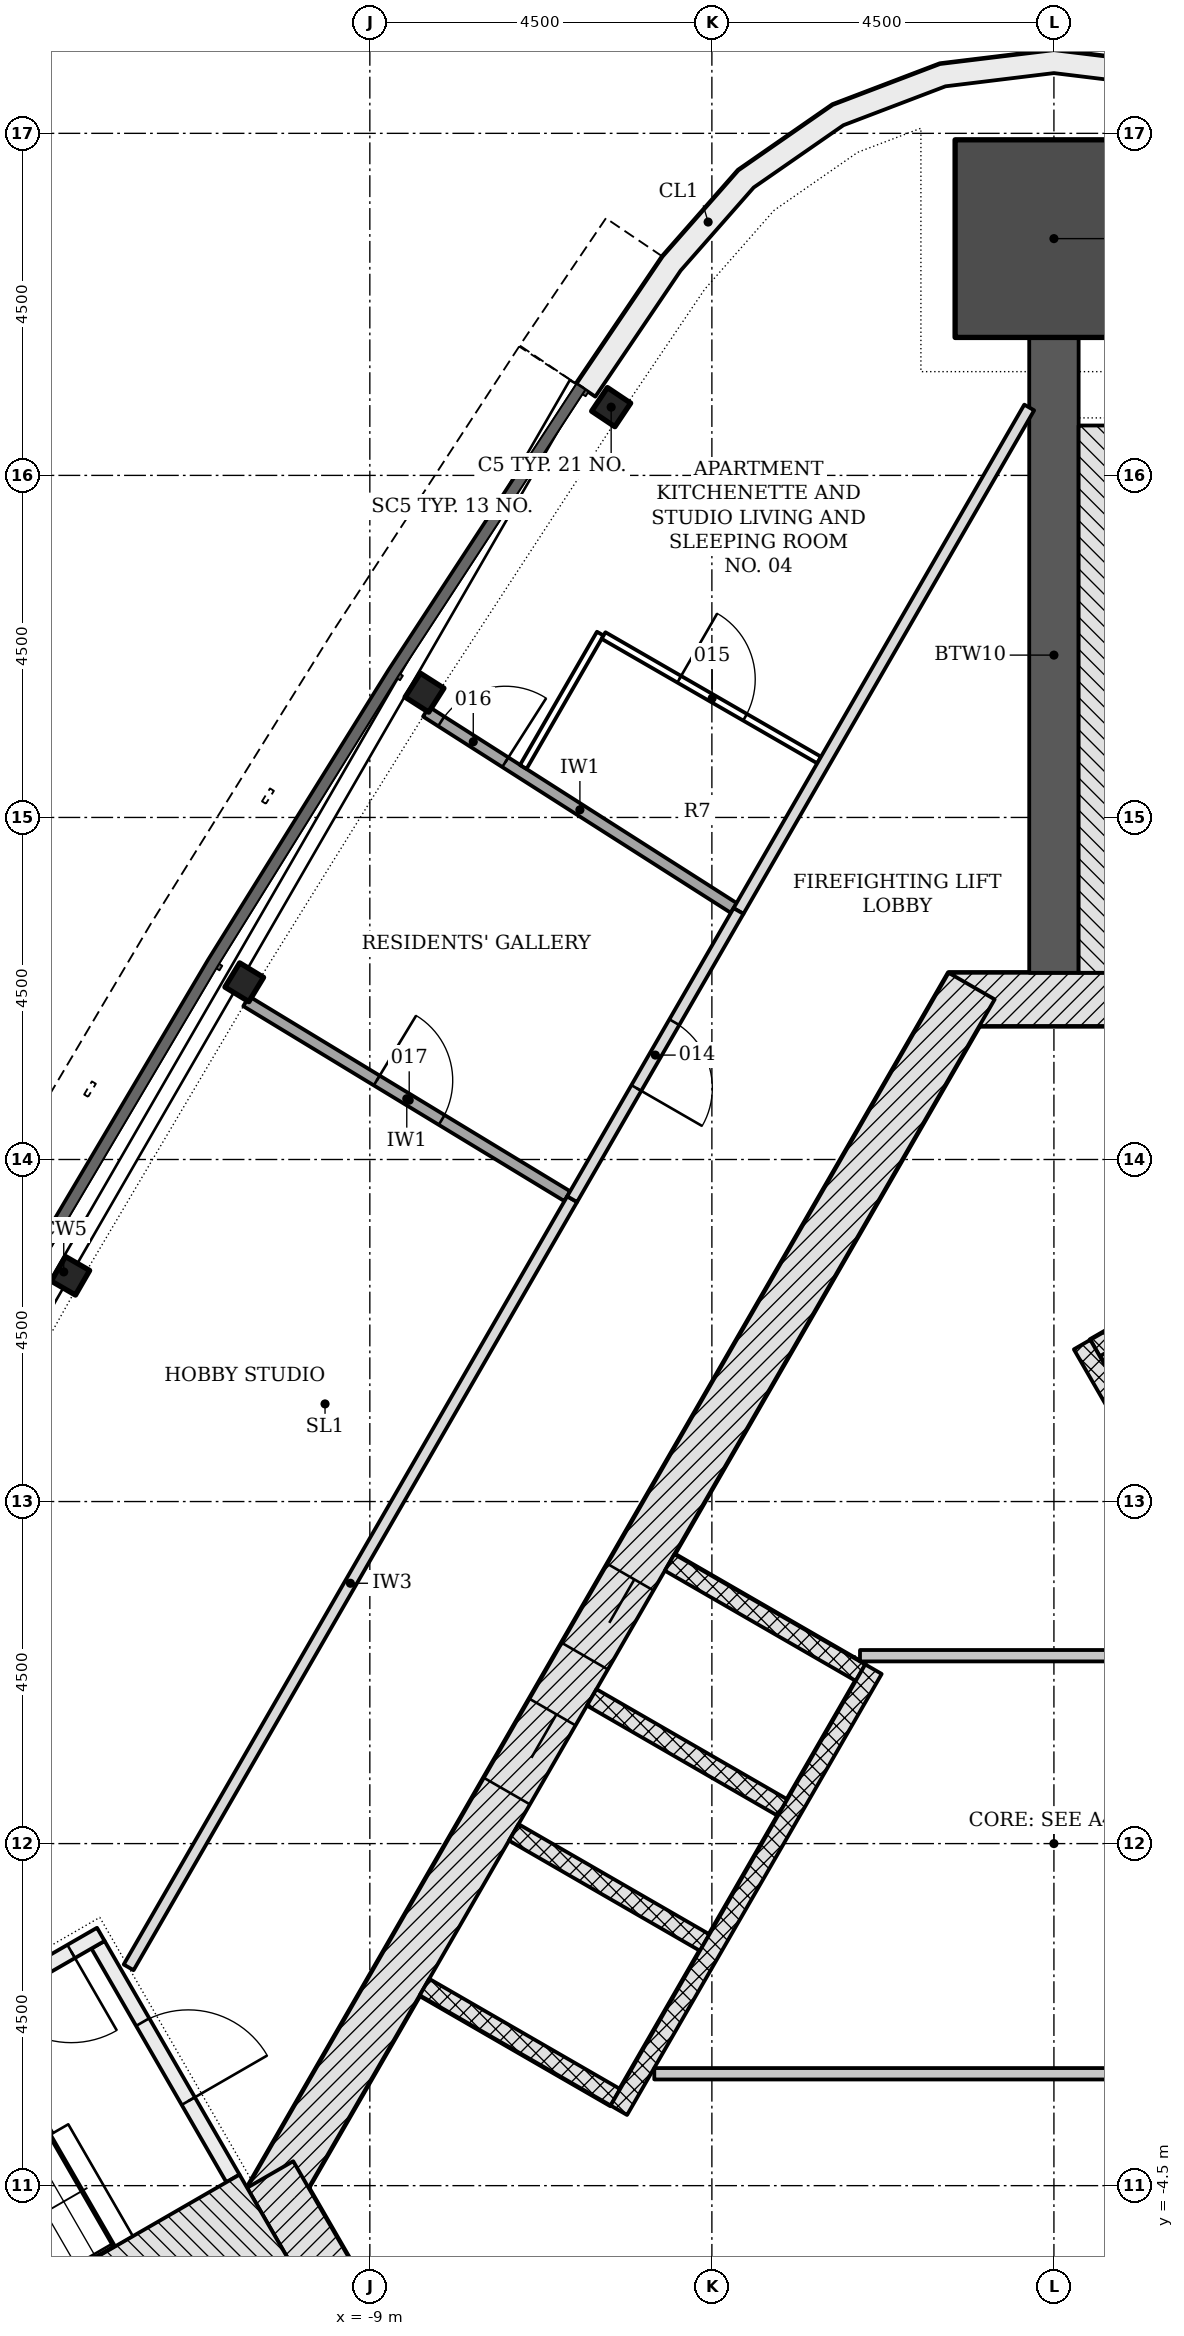
"""IFC4 building model, lengths in metres.
Left out: names, types, materials, properties, quantities, classifications, styles, units other than length and angle.
Written with IfcOpenShell. Run it as: python <this file> out.ifc"""

import sys

from ifc_helpers import new_model, si_unit, direction, frame, frame_2d, origin, origin_2d, place, context, subcontext, project, spatial, polyline, rectangle, i_section, outline, extrude, element, fill, save


model = new_model("IFC4")
c1 = context("Model", 3, precision=1e-05, world=origin(), true_north=direction((0.0, 1.0)))
c2 = subcontext(c1, "Body", "Model", "MODEL_VIEW")
j1 = project(units=[si_unit("LENGTHUNIT", "METRE"), si_unit("PLANEANGLEUNIT", "RADIAN")], contexts=[c1])
p1 = place(None, origin())
s1 = spatial("IfcSite", under=j1, at=p1, CompositionType="ELEMENT")
p2 = place(p1, origin())
s2 = spatial("IfcBuilding", under=s1, at=p2, CompositionType="ELEMENT")
p3 = place(p2, frame((0.0, 0.0, 222.0)))
s3 = spatial("IfcBuildingStorey", under=s2, at=p3, CompositionType="ELEMENT", Elevation=222.0)
p4 = place(p3, frame((1.386, 11.106, -0.2), z_axis=(0.0, 0.0, 1.0), x_axis=(-1.0, 0.0, 0.0)))
e1 = element("IfcWall", 1, at=p4, inside=s3, PredefinedType="SHEAR", context=c2, shape_type="SweptSolid", body=[
    extrude(rectangle(XDim=2.771, YDim=0.7, at=frame_2d((1.386, 0.0))), origin(), (0.0, 0.0, 1.0), 3.6),
])
p5 = place(p3, frame((-1.083, 11.281, -0.2), z_axis=(0.0, 0.0, 1.0), x_axis=(-0.500001446645, -0.866024568562, 0.0)))
e2 = element("IfcWall", 2, at=p5, inside=s3, PredefinedType="SHEAR", context=c2, shape_type="SweptSolid", body=[
    extrude(rectangle(XDim=18.458, YDim=0.7, at=frame_2d((9.229, 0.0))), origin(), (0.0, 0.0, 1.0), 3.6),
])
p6 = place(p5, frame((8.979, 0.0, 0.2)))
e3 = element("IfcOpeningElement", 3, at=p6, cuts=e2, PredefinedType="OPENING", context=c2, shape_type="SweptSolid", body=[
    extrude(rectangle(XDim=1.2, YDim=2.1, at=frame_2d((0.6, 1.05))), frame((0.0, 0.36, 0.0), z_axis=(0.0, -1.0, 0.0), x_axis=(1.0, 0.0, 0.0)), (0.0, 0.0, 1.0), 0.72),
])
p7 = place(p5, frame((11.029, 0.0, 0.2)))
e4 = element("IfcOpeningElement", 4, at=p7, cuts=e2, PredefinedType="OPENING", context=c2, shape_type="SweptSolid", body=[
    extrude(rectangle(XDim=1.2, YDim=2.1, at=frame_2d((0.6, 1.05))), frame((0.0, 0.36, 0.0), z_axis=(0.0, -1.0, 0.0), x_axis=(1.0, 0.0, 0.0)), (0.0, 0.0, 1.0), 0.72),
])
p8 = place(p3, frame((-10.311, -4.353, -0.2), z_axis=(0.0, 0.0, 1.0), x_axis=(0.500042739161, -0.866000726912, 0.0)))
e5 = element("IfcWall", 5, at=p8, inside=s3, PredefinedType="SHEAR", context=c2, shape_type="SweptSolid", body=[
    extrude(rectangle(XDim=2.771, YDim=0.7, at=frame_2d((1.386, 0.0))), origin(), (0.0, 0.0, 1.0), 3.6),
])
p9 = place(p3, frame((0.0, 11.456, -0.2), z_axis=(0.0, 0.0, 1.0), x_axis=(0.0, 1.0, 0.0)))
e6 = element("IfcWall", 6, at=p9, inside=s3, PredefinedType="SHEAR", context=c2, shape_type="SweptSolid", body=[
    extrude(rectangle(XDim=8.359, YDim=0.65, at=frame_2d((4.179, 0.0))), origin(), (0.0, 0.0, 1.0), 3.6),
])
p10 = place(p3, frame((0.0, 21.115, -0.2), z_axis=(0.0, 0.0, 1.0), x_axis=(0.0, 1.0, 0.0)))
e7 = element("IfcColumn", 7, at=p10, inside=s3, PredefinedType="COLUMN", context=c2, shape_type="SweptSolid", body=[
    extrude(rectangle(XDim=2.6, YDim=2.6, at=origin_2d()), origin(), (0.0, 0.0, 1.0), 3.6),
])
for number, where, z_axis, x_axis in (
    (8, (-5.825, 18.898, -0.2), (0.0, 0.0, 1.0), (-0.556, -0.831, 0.0)),
    (9, (-8.281, 15.142, -0.2), (0.0, 0.0, 1.0), (-0.538, -0.843, 0.0)),
    (10, (-10.652, 11.332, -0.2), (0.0, 0.0, 1.0), (-0.519, -0.855, 0.0)),
    (11, (-12.939, 7.47, -0.2), (0.0, 0.0, 1.0), (-0.5, -0.866, 0.0)),
):
    element("IfcColumn", number, at=place(p3, frame(where, z_axis=z_axis, x_axis=x_axis)), inside=s3, PredefinedType="COLUMN", context=c2, shape_type="SweptSolid", body=[
        extrude(i_section(OverallWidth=0.373, OverallDepth=0.368, WebThickness=0.015, FlangeThickness=0.024, FilletRadius=0.015, at=origin_2d()), origin(), (0.0, 0.0, 1.0), 3.6),
    ])
p11 = place(p3, origin())
e12 = element("IfcWall", 12, at=p11, inside=s3, PredefinedType="NOTDEFINED", context=c2, shape_type="SweptSolid", body=[
    extrude(outline(polyline([(6.282, 19.204), (5.149, 20.879), (4.151, 22.013), (2.911, 22.874), (1.499, 23.412), (0.0, 23.595), (-1.499, 23.412), (-2.911, 22.874), (-4.151, 22.013), (-5.149, 20.879), (-6.282, 19.204), (-6.034, 19.036), (-4.911, 20.695), (-3.95, 21.787), (-2.77, 22.607), (-1.427, 23.119), (0.0, 23.293), (1.427, 23.119), (2.77, 22.607), (3.95, 21.787), (4.911, 20.695), (6.034, 19.036), (6.282, 19.204)])), origin(), (0.0, 0.0, 1.0), 3.3),
])
p12 = place(p3, frame((2.706, 7.769, -0.2), z_axis=(0.0, 0.0, 1.0), x_axis=(-0.866022959057, -0.500004234368, 0.0)))
e13 = element("IfcWall", 13, at=p12, inside=s3, PredefinedType="PARTITIONING", context=c2, shape_type="SweptSolid", body=[
    extrude(rectangle(XDim=2.5, YDim=0.25, at=frame_2d((1.25, 0.0))), origin(), (0.0, 0.0, 1.0), 3.6),
])
p13 = place(p3, frame((5.87, -2.961, 0.0), z_axis=(0.0, 0.0, 1.0), x_axis=(-0.50000615651, 0.866021849293, 0.0)))
e14 = element("IfcWall", 14, at=p13, inside=s3, PredefinedType="PARTITIONING", context=c2, shape_type="SweptSolid", body=[
    extrude(rectangle(XDim=11.0, YDim=0.25, at=frame_2d((5.5, 0.0))), origin(), (0.0, 0.0, 1.0), 3.4),
])
for number, where, z_axis, x_axis in (
    (15, (-5.056, 3.699, -0.2), (0.0, 0.0, 1.0), (0.866, -0.5, 0.0)),
    (16, (-6.081, 1.923, -0.2), (0.0, 0.0, 1.0), (0.866, -0.5, 0.0)),
    (17, (-7.106, 0.148, -0.2), (0.0, 0.0, 1.0), (0.866, -0.5, 0.0)),
    (18, (-8.281, -1.887, -0.2), (0.0, 0.0, 1.0), (0.866, -0.5, 0.0)),
):
    element("IfcWall", number, at=place(p3, frame(where, z_axis=z_axis, x_axis=x_axis)), inside=s3, PredefinedType="PARTITIONING", context=c2, shape_type="SweptSolid", body=[
        extrude(rectangle(XDim=2.9, YDim=0.25, at=frame_2d((1.45, 0.0))), origin(), (0.0, 0.0, 1.0), 3.6),
    ])
p14 = place(p3, frame((-2.374, 2.294, 0.0), z_axis=(0.0, 0.0, 1.0), x_axis=(-0.500003174267, -0.866023571113, 0.0)))
e19 = element("IfcWall", 19, at=p14, inside=s3, PredefinedType="PARTITIONING", context=c2, shape_type="SweptSolid", body=[
    extrude(rectangle(XDim=6.7, YDim=0.25, at=frame_2d((3.35, 0.0))), origin(), (0.0, 0.0, 1.0), 3.4),
])
p15 = place(p3, frame((-5.258, -3.028, 0.0), z_axis=(0.0, 0.0, 1.0), x_axis=(1.0, 0.0, 0.0)))
e20 = element("IfcWall", 20, at=p15, inside=s3, PredefinedType="PARTITIONING", context=c2, shape_type="SweptSolid", body=[
    extrude(rectangle(XDim=6.404, YDim=0.15, at=frame_2d((3.202, 0.0))), origin(), (0.0, 0.0, 1.0), 3.4),
])
p16 = place(p3, frame((-2.551, 2.472, 0.0), z_axis=(0.0, 0.0, 1.0), x_axis=(1.0, 0.0, 0.0)))
e21 = element("IfcWall", 21, at=p16, inside=s3, PredefinedType="PARTITIONING", context=c2, shape_type="SweptSolid", body=[
    extrude(rectangle(XDim=3.698, YDim=0.15, at=frame_2d((1.849, 0.0))), origin(), (0.0, 0.0, 1.0), 3.4),
])
p17 = place(p3, frame((0.955, 11.456, -0.2), z_axis=(0.0, 0.0, 1.0), x_axis=(0.0, 1.0, 0.0)))
e22 = element("IfcWall", 22, at=p17, inside=s3, PredefinedType="SHEAR", context=c2, shape_type="SweptSolid", body=[
    extrude(rectangle(XDim=7.2, YDim=1.261, at=frame_2d((3.6, 0.0))), origin(), (0.0, 0.0, 1.0), 3.6),
])
p18 = place(p3, frame((-12.576, -1.331, -0.2), z_axis=(0.0, 0.0, 1.0), x_axis=(0.499970499736, -0.8660424351, 0.0)))
e23 = element("IfcWall", 23, at=p18, inside=s3, PredefinedType="SHEAR", context=c2, shape_type="SweptSolid", body=[
    extrude(rectangle(XDim=3.55, YDim=0.2, at=frame_2d((1.775, 0.0))), origin(), (0.0, 0.0, 1.0), 3.6),
])
p19 = place(p18, frame((1.175, 0.0, 0.2)))
e24 = element("IfcOpeningElement", 24, at=p19, cuts=e23, PredefinedType="OPENING", context=c2, shape_type="SweptSolid", body=[
    extrude(rectangle(XDim=1.2, YDim=2.1, at=frame_2d((0.6, 1.05))), frame((0.0, 0.11, 0.0), z_axis=(0.0, -1.0, 0.0), x_axis=(1.0, 0.0, 0.0)), (0.0, 0.0, 1.0), 0.22),
])
p20 = place(p3, frame((-12.539, -1.194, -0.2), z_axis=(0.0, 0.0, 1.0), x_axis=(-0.866045472092, -0.499965239061, 0.0)))
e25 = element("IfcWall", 25, at=p20, inside=s3, PredefinedType="SHEAR", context=c2, shape_type="SweptSolid", body=[
    extrude(rectangle(XDim=5.6, YDim=0.2, at=frame_2d((2.8, 0.0))), origin(), (0.0, 0.0, 1.0), 3.6),
])
p21 = place(p20, frame((0.45, 0.0, 0.2)))
e26 = element("IfcOpeningElement", 26, at=p21, cuts=e25, PredefinedType="OPENING", context=c2, shape_type="SweptSolid", body=[
    extrude(rectangle(XDim=1.2, YDim=2.1, at=frame_2d((0.6, 1.05))), frame((0.0, 0.11, 0.0), z_axis=(0.0, -1.0, 0.0), x_axis=(1.0, 0.0, 0.0)), (0.0, 0.0, 1.0), 0.22),
])
p22 = place(p3, frame((-10.399, -4.901, -0.2), z_axis=(0.0, 0.0, 1.0), x_axis=(-0.866018442252, -0.500012057535, 0.0)))
e27 = element("IfcWall", 27, at=p22, inside=s3, PredefinedType="SHEAR", context=c2, shape_type="SweptSolid", body=[
    extrude(rectangle(XDim=7.2, YDim=1.261, at=frame_2d((3.6, 0.0))), origin(), (0.0, 0.0, 1.0), 3.6),
])
p23 = place(p3, frame((-0.325, 18.894, 0.0), z_axis=(0.0, 0.0, 1.0), x_axis=(-0.500004255962, -0.86602294659, 0.0)))
e28 = element("IfcWall", 28, at=p23, inside=s3, PredefinedType="PARTITIONING", context=c2, shape_type="SweptSolid", body=[
    extrude(rectangle(XDim=7.649, YDim=0.15, at=frame_2d((3.825, 0.0))), origin(), (0.0, 0.0, 1.0), 2.852),
])
p24 = place(p3, frame((-6.338, 8.478, 0.0), z_axis=(0.0, 0.0, 1.0), x_axis=(-0.499993497815, -0.86602915779, 0.0)))
e29 = element("IfcWall", 29, at=p24, inside=s3, PredefinedType="PARTITIONING", context=c2, shape_type="SweptSolid", body=[
    extrude(rectangle(XDim=11.67, YDim=0.15, at=frame_2d((5.835, 0.0))), origin(), (0.0, 0.0, 1.0), 2.852),
])
p25 = place(p3, frame((-8.26, 14.891, 0.0), z_axis=(0.0, 0.0, 1.0), x_axis=(0.843047331612, -0.537839378125, 0.0)))
e30 = element("IfcWall", 30, at=p25, inside=s3, PredefinedType="PARTITIONING", context=c2, shape_type="SweptSolid", body=[
    extrude(rectangle(XDim=4.8, YDim=0.15, at=frame_2d((2.4, 0.0))), origin(), (0.0, 0.0, 1.0), 3.4),
])
p26 = place(p25, frame((0.236, 0.0, 0.0)))
e31 = element("IfcOpeningElement", 31, at=p26, cuts=e30, PredefinedType="OPENING", context=c2, shape_type="SweptSolid", body=[
    extrude(rectangle(XDim=1.0, YDim=2.1, at=frame_2d((0.5, 1.05))), frame((0.0, 0.085, 0.0), z_axis=(0.0, -1.0, 0.0), x_axis=(1.0, 0.0, 0.0)), (0.0, 0.0, 1.0), 0.17),
])
p27 = place(p3, frame((-10.626, 11.082, 0.0), z_axis=(0.0, 0.0, 1.0), x_axis=(0.854742891139, -0.519051625609, 0.0)))
e32 = element("IfcWall", 32, at=p27, inside=s3, PredefinedType="PARTITIONING", context=c2, shape_type="SweptSolid", body=[
    extrude(rectangle(XDim=4.941, YDim=0.15, at=frame_2d((2.471, 0.0))), origin(), (0.0, 0.0, 1.0), 3.4),
])
p28 = place(p27, frame((2.008, 0.0, 0.0)))
e33 = element("IfcOpeningElement", 33, at=p28, cuts=e32, PredefinedType="OPENING", context=c2, shape_type="SweptSolid", body=[
    extrude(rectangle(XDim=1.0, YDim=2.1, at=frame_2d((0.5, 1.05))), frame((0.0, 0.085, 0.0), z_axis=(0.0, -1.0, 0.0), x_axis=(1.0, 0.0, 0.0)), (0.0, 0.0, 1.0), 0.17),
])
p29 = place(p3, frame((-4.15, 12.269, 0.0), z_axis=(0.0, 0.0, 1.0), x_axis=(-0.499996027077, -0.86602769754, 0.0)))
e34 = element("IfcWall", 34, at=p29, inside=s3, PredefinedType="PARTITIONING", context=c2, shape_type="SweptSolid", body=[
    extrude(rectangle(XDim=4.377, YDim=0.15, at=frame_2d((2.189, 0.0))), origin(), (0.0, 0.0, 1.0), 2.852),
])
p30 = place(p29, frame((1.689, 0.0, 0.0)))
e35 = element("IfcOpeningElement", 35, at=p30, cuts=e34, PredefinedType="OPENING", context=c2, shape_type="SweptSolid", body=[
    extrude(rectangle(XDim=1.0, YDim=2.1, at=frame_2d((0.5, 1.05))), frame((0.0, 0.085, 0.0), z_axis=(0.0, -1.0, 0.0), x_axis=(1.0, 0.0, 0.0)), (0.0, 0.0, 1.0), 0.17),
])
p31 = place(p3, frame((-6.981, 14.165, 0.0), z_axis=(0.0, 0.0, 1.0), x_axis=(0.500042536776, 0.866000843773, 0.0)))
e36 = element("IfcWall", 36, at=p31, inside=s3, PredefinedType="PARTITIONING", context=c2, shape_type="SweptSolid", body=[
    extrude(rectangle(XDim=2.025, YDim=0.1, at=frame_2d((1.012, 0.0))), origin(), (0.0, 0.0, 1.0), 2.852),
])
p32 = place(p3, frame((-5.926, 15.893, 0.0), z_axis=(0.0, 0.0, 1.0), x_axis=(0.866027924134, -0.499995634601, 0.0)))
e37 = element("IfcWall", 37, at=p32, inside=s3, PredefinedType="PARTITIONING", context=c2, shape_type="SweptSolid", body=[
    extrude(rectangle(XDim=3.275, YDim=0.1, at=frame_2d((1.637, 0.0))), origin(), (0.0, 0.0, 1.0), 3.4),
])
p33 = place(p32, frame((1.15, 0.0, 0.0)))
e38 = element("IfcOpeningElement", 38, at=p33, cuts=e37, PredefinedType="OPENING", context=c2, shape_type="SweptSolid", body=[
    extrude(rectangle(XDim=1.0, YDim=2.1, at=frame_2d((0.5, 1.05))), frame((0.0, 0.06, 0.0), z_axis=(0.0, -1.0, 0.0), x_axis=(1.0, 0.0, 0.0)), (0.0, 0.0, 1.0), 0.12),
])
p34 = place(p6, origin())
e39 = element("IfcDoor", 39, at=p34, inside=s3, OperationType="DOUBLE_DOOR_SLIDING", PredefinedType="DOOR", context=c2, shape_type="SweptSolid", body=[
    extrude(rectangle(XDim=1.2, YDim=2.1, at=frame_2d((0.6, 1.05))), frame((0.0, 0.025, 0.0), z_axis=(0.0, -1.0, 0.0), x_axis=(1.0, 0.0, 0.0)), (0.0, 0.0, 1.0), 0.05),
])
fill(e3, e39)
p35 = place(p7, origin())
e40 = element("IfcDoor", 40, at=p35, inside=s3, OperationType="DOUBLE_DOOR_SLIDING", PredefinedType="DOOR", context=c2, shape_type="SweptSolid", body=[
    extrude(rectangle(XDim=1.2, YDim=2.1, at=frame_2d((0.6, 1.05))), frame((0.0, 0.025, 0.0), z_axis=(0.0, -1.0, 0.0), x_axis=(1.0, 0.0, 0.0)), (0.0, 0.0, 1.0), 0.05),
])
fill(e4, e40)
p36 = place(p19, origin())
e41 = element("IfcDoor", 41, at=p36, inside=s3, OperationType="SINGLE_SWING_RIGHT", PredefinedType="DOOR", context=c2, shape_type="SweptSolid", body=[
    extrude(rectangle(XDim=1.2, YDim=2.1, at=frame_2d((0.6, 1.05))), frame((0.0, 0.025, 0.0), z_axis=(0.0, -1.0, 0.0), x_axis=(1.0, 0.0, 0.0)), (0.0, 0.0, 1.0), 0.05),
])
fill(e24, e41)
p37 = place(p21, origin())
e42 = element("IfcDoor", 42, at=p37, inside=s3, OperationType="SINGLE_SWING_LEFT", PredefinedType="DOOR", context=c2, shape_type="SweptSolid", body=[
    extrude(rectangle(XDim=1.2, YDim=2.1, at=frame_2d((0.6, 1.05))), frame((0.0, 0.025, 0.0), z_axis=(0.0, -1.0, 0.0), x_axis=(1.0, 0.0, 0.0)), (0.0, 0.0, 1.0), 0.05),
])
fill(e26, e42)
p38 = place(p30, origin())
e43 = element("IfcDoor", 43, at=p38, inside=s3, OperationType="SINGLE_SWING_RIGHT", PredefinedType="DOOR", context=c2, shape_type="SweptSolid", body=[
    extrude(rectangle(XDim=1.0, YDim=2.1, at=frame_2d((0.5, 1.05))), frame((0.0, 0.025, 0.0), z_axis=(0.0, -1.0, 0.0), x_axis=(1.0, 0.0, 0.0)), (0.0, 0.0, 1.0), 0.05),
])
fill(e35, e43)
p39 = place(p33, origin())
e44 = element("IfcDoor", 44, at=p39, inside=s3, OperationType="SINGLE_SWING_LEFT", PredefinedType="DOOR", context=c2, shape_type="SweptSolid", body=[
    extrude(rectangle(XDim=1.0, YDim=2.1, at=frame_2d((0.5, 1.05))), frame((0.0, 0.025, 0.0), z_axis=(0.0, -1.0, 0.0), x_axis=(1.0, 0.0, 0.0)), (0.0, 0.0, 1.0), 0.05),
])
fill(e38, e44)
p40 = place(p26, origin())
e45 = element("IfcDoor", 45, at=p40, inside=s3, OperationType="SINGLE_SWING_RIGHT", PredefinedType="DOOR", context=c2, shape_type="SweptSolid", body=[
    extrude(rectangle(XDim=1.0, YDim=2.1, at=frame_2d((0.5, 1.05))), frame((0.0, 0.025, 0.0), z_axis=(0.0, -1.0, 0.0), x_axis=(1.0, 0.0, 0.0)), (0.0, 0.0, 1.0), 0.05),
])
fill(e31, e45)
p41 = place(p28, origin())
e46 = element("IfcDoor", 46, at=p41, inside=s3, OperationType="SINGLE_SWING_LEFT", PredefinedType="DOOR", context=c2, shape_type="SweptSolid", body=[
    extrude(rectangle(XDim=1.0, YDim=2.1, at=frame_2d((0.5, 1.05))), frame((0.0, 0.025, 0.0), z_axis=(0.0, -1.0, 0.0), x_axis=(1.0, 0.0, 0.0)), (0.0, 0.0, 1.0), 0.05),
])
fill(e33, e46)
save(model, sys.argv[1])
